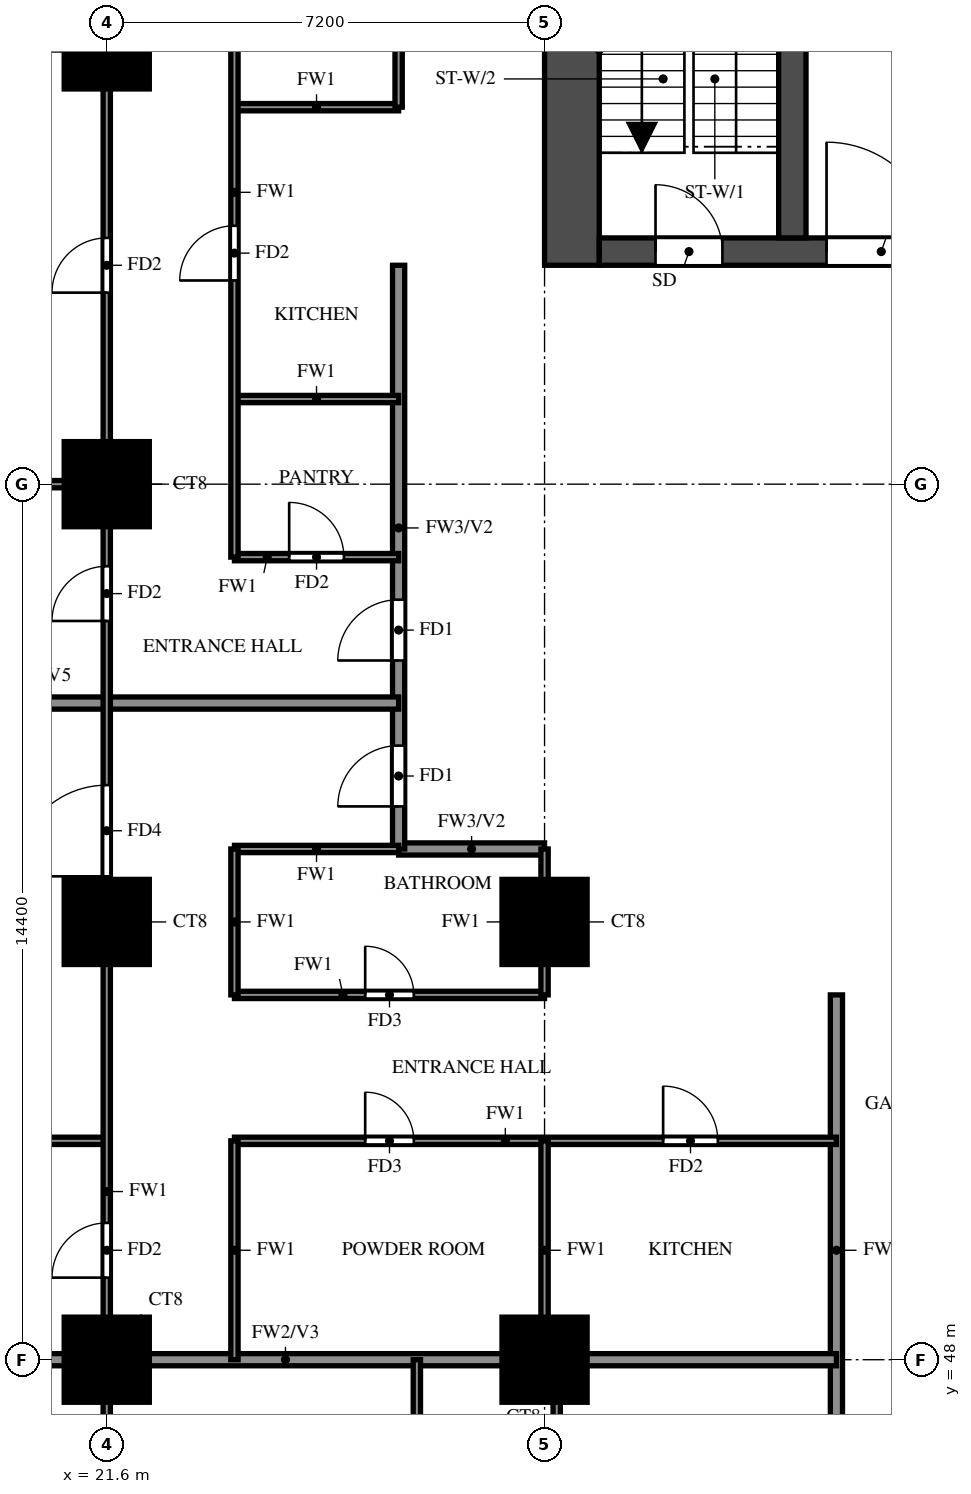
"""IFC4 building model, lengths in metres.
Left out: names, types, materials, properties, quantities, classifications, styles, units other than length and angle.
Written with IfcOpenShell. Run it as: python <this file> out.ifc"""

import sys

from ifc_helpers import new_model, si_unit, direction, frame, frame_2d, origin, origin_2d, place, context, subcontext, project, spatial, rectangle, extrude, source, transform, mapped, element, fill, save


model = new_model("IFC4")
c1 = context("Model", 3, precision=1e-05, world=origin(), true_north=direction((0.0, 1.0)))
c2 = subcontext(c1, "Body", "Model", "MODEL_VIEW")
j1 = project(units=[si_unit("LENGTHUNIT", "METRE"), si_unit("PLANEANGLEUNIT", "RADIAN")], contexts=[c1])
p1 = place(None, origin())
s1 = spatial("IfcSite", under=j1, at=p1, CompositionType="ELEMENT")
p2 = place(p1, origin())
s2 = spatial("IfcBuilding", under=s1, at=p2, CompositionType="ELEMENT")
p3 = place(p2, frame((0.0, 0.0, 41.0)))
s3 = spatial("IfcBuildingStorey", under=s2, at=p3, CompositionType="ELEMENT", Elevation=41.0)
m1 = source(origin(), c2, "Body", "SweptSolid", [
    extrude(rectangle(XDim=1.4, YDim=1.4, at=origin_2d()), origin(), (0.0, 0.0, 1.0), 3.18),
])
for number, where, z_axis, x_axis in (
    (1, (21.6, 48.0, 0.0), (0.0, 0.0, 1.0), (1.0, 0.0, 0.0)),
    (2, (28.8, 48.0, 0.0), (0.0, 0.0, 1.0), (1.0, 0.0, 0.0)),
    (3, (21.6, 55.2, 0.0), (0.0, 0.0, 1.0), (1.0, 0.0, 0.0)),
    (4, (28.8, 55.2, 0.0), (0.0, 0.0, 1.0), (1.0, 0.0, 0.0)),
    (5, (21.6, 62.4, 0.0), (0.0, 0.0, 1.0), (1.0, 0.0, 0.0)),
    (6, (21.6, 69.6, 0.0), (0.0, 0.0, 1.0), (1.0, 0.0, 0.0)),
):
    element("IfcColumn", number, at=place(p3, frame(where, z_axis=z_axis, x_axis=x_axis)), inside=s3, PredefinedType="COLUMN", context=c2, shape_type="MappedRepresentation", body=[
        mapped(m1, transform((0.0, 0.0, 0.0))),
    ])
p4 = place(p3, frame((29.25, 66.0, 0.0), z_axis=(0.0, 0.0, 1.0), x_axis=(0.0, 1.0, 0.0)))
e7 = element("IfcWall", 7, at=p4, inside=s3, PredefinedType="SHEAR", context=c2, shape_type="SweptSolid", body=[
    extrude(rectangle(XDim=12.0, YDim=0.9, at=frame_2d((6.0, 0.0))), origin(), (0.0, 0.0, 1.0), 3.18),
])
p5 = place(p3, frame((29.7, 66.225, 0.0), z_axis=(0.0, 0.0, 1.0), x_axis=(1.0, 0.0, 0.0)))
e8 = element("IfcWall", 8, at=p5, inside=s3, PredefinedType="SHEAR", context=c2, shape_type="SweptSolid", body=[
    extrude(rectangle(XDim=41.4, YDim=0.45, at=frame_2d((20.7, 0.0))), origin(), (0.0, 0.0, 1.0), 3.18),
])
p6 = place(p5, frame((0.925, 0.0, 0.0)))
e9 = element("IfcOpeningElement", 9, at=p6, cuts=e8, PredefinedType="OPENING", context=c2, shape_type="SweptSolid", body=[
    extrude(rectangle(XDim=1.1, YDim=2.1, at=frame_2d((0.55, 1.05))), frame((0.0, 0.235, 0.0), z_axis=(0.0, -1.0, 0.0), x_axis=(1.0, 0.0, 0.0)), (0.0, 0.0, 1.0), 0.47),
])
p7 = place(p5, frame((3.738, 0.0, 0.0)))
e10 = element("IfcOpeningElement", 10, at=p7, cuts=e8, PredefinedType="OPENING", context=c2, shape_type="SweptSolid", body=[
    extrude(rectangle(XDim=1.8, YDim=2.1, at=frame_2d((0.9, 1.05))), frame((0.0, 0.235, 0.0), z_axis=(0.0, -1.0, 0.0), x_axis=(1.0, 0.0, 0.0)), (0.0, 0.0, 1.0), 0.47),
])
p8 = place(p3, frame((32.875, 66.45, 0.0), z_axis=(0.0, 0.0, 1.0), x_axis=(0.0, 1.0, 0.0)))
e11 = element("IfcWall", 11, at=p8, inside=s3, PredefinedType="SHEAR", context=c2, shape_type="SweptSolid", body=[
    extrude(rectangle(XDim=10.65, YDim=0.45, at=frame_2d((5.325, 0.0))), origin(), (0.0, 0.0, 1.0), 3.18),
])
p9 = place(p3, frame((26.4, 56.4, 0.0), z_axis=(0.0, 0.0, 1.0), x_axis=(1.0, 0.0, 0.0)))
e12 = element("IfcWall", 12, at=p9, inside=s3, PredefinedType="SOLIDWALL", context=c2, shape_type="SweptSolid", body=[
    extrude(rectangle(XDim=2.4, YDim=0.2, at=frame_2d((1.2, 0.0))), origin(), (0.0, 0.0, 1.0), 3.18),
])
p10 = place(p3, frame((26.4, 56.4, 0.0), z_axis=(0.0, 0.0, 1.0), x_axis=(0.0, 1.0, 0.0)))
e13 = element("IfcWall", 13, at=p10, inside=s3, PredefinedType="SOLIDWALL", context=c2, shape_type="SweptSolid", body=[
    extrude(rectangle(XDim=9.6, YDim=0.2, at=frame_2d((4.8, 0.0))), origin(), (0.0, 0.0, 1.0), 3.18),
])
p11 = place(p10, frame((0.7, 0.0, 0.0)))
e14 = element("IfcOpeningElement", 14, at=p11, cuts=e13, PredefinedType="OPENING", context=c2, shape_type="SweptSolid", body=[
    extrude(rectangle(XDim=1.0, YDim=2.1, at=frame_2d((0.5, 1.05))), frame((0.0, 0.11, 0.0), z_axis=(0.0, -1.0, 0.0), x_axis=(1.0, 0.0, 0.0)), (0.0, 0.0, 1.0), 0.22),
])
p12 = place(p10, frame((3.1, 0.0, 0.0)))
e15 = element("IfcOpeningElement", 15, at=p12, cuts=e13, PredefinedType="OPENING", context=c2, shape_type="SweptSolid", body=[
    extrude(rectangle(XDim=1.0, YDim=2.1, at=frame_2d((0.5, 1.05))), frame((0.0, 0.11, 0.0), z_axis=(0.0, -1.0, 0.0), x_axis=(1.0, 0.0, 0.0)), (0.0, 0.0, 1.0), 0.22),
])
p13 = place(p3, frame((33.6, 45.6, 0.0), z_axis=(0.0, 0.0, 1.0), x_axis=(0.0, 1.0, 0.0)))
e16 = element("IfcWall", 16, at=p13, inside=s3, PredefinedType="SOLIDWALL", context=c2, shape_type="SweptSolid", body=[
    extrude(rectangle(XDim=8.4, YDim=0.2, at=frame_2d((4.2, 0.0))), origin(), (0.0, 0.0, 1.0), 3.18),
])
p14 = place(p3, frame((14.525, 48.0, 0.0), z_axis=(0.0, 0.0, 1.0), x_axis=(1.0, 0.0, 0.0)))
e17 = element("IfcWall", 17, at=p14, inside=s3, PredefinedType="SOLIDWALL", context=c2, shape_type="SweptSolid", body=[
    extrude(rectangle(XDim=19.075, YDim=0.2, at=frame_2d((9.538, 0.0))), origin(), (0.0, 0.0, 1.0), 3.18),
])
p15 = place(p3, frame((14.525, 58.8, 0.0), z_axis=(0.0, 0.0, 1.0), x_axis=(1.0, 0.0, 0.0)))
e18 = element("IfcWall", 18, at=p15, inside=s3, PredefinedType="SOLIDWALL", context=c2, shape_type="SweptSolid", body=[
    extrude(rectangle(XDim=11.875, YDim=0.2, at=frame_2d((5.938, 0.0))), origin(), (0.0, 0.0, 1.0), 2.28),
])
p16 = place(p3, frame((14.525, 51.6, 0.0), z_axis=(0.0, 0.0, 1.0), x_axis=(1.0, 0.0, 0.0)))
e19 = element("IfcWall", 19, at=p16, inside=s3, PredefinedType="PARTITIONING", context=c2, shape_type="SweptSolid", body=[
    extrude(rectangle(XDim=7.075, YDim=0.12, at=frame_2d((3.538, 0.0))), origin(), (0.0, 0.0, 1.0), 2.28),
])
p17 = place(p3, frame((23.7, 51.6, 0.0), z_axis=(0.0, 0.0, 1.0), x_axis=(1.0, 0.0, 0.0)))
e20 = element("IfcWall", 20, at=p17, inside=s3, PredefinedType="PARTITIONING", context=c2, shape_type="SweptSolid", body=[
    extrude(rectangle(XDim=9.9, YDim=0.12, at=frame_2d((4.95, 0.0))), origin(), (0.0, 0.0, 1.0), 3.18),
])
p18 = place(p17, frame((2.15, 0.0, 0.0)))
e21 = element("IfcOpeningElement", 21, at=p18, cuts=e20, PredefinedType="OPENING", context=c2, shape_type="SweptSolid", body=[
    extrude(rectangle(XDim=0.8, YDim=2.1, at=frame_2d((0.4, 1.05))), frame((0.0, 0.07, 0.0), z_axis=(0.0, -1.0, 0.0), x_axis=(1.0, 0.0, 0.0)), (0.0, 0.0, 1.0), 0.14),
])
p19 = place(p17, frame((7.05, 0.0, 0.0)))
e22 = element("IfcOpeningElement", 22, at=p19, cuts=e20, PredefinedType="OPENING", context=c2, shape_type="SweptSolid", body=[
    extrude(rectangle(XDim=0.9, YDim=2.1, at=frame_2d((0.45, 1.05))), frame((0.0, 0.07, 0.0), z_axis=(0.0, -1.0, 0.0), x_axis=(1.0, 0.0, 0.0)), (0.0, 0.0, 1.0), 0.14),
])
p20 = place(p3, frame((23.7, 54.0, 0.0), z_axis=(0.0, 0.0, 1.0), x_axis=(1.0, 0.0, 0.0)))
e23 = element("IfcWall", 23, at=p20, inside=s3, PredefinedType="PARTITIONING", context=c2, shape_type="SweptSolid", body=[
    extrude(rectangle(XDim=5.1, YDim=0.12, at=frame_2d((2.55, 0.0))), origin(), (0.0, 0.0, 1.0), 3.18),
])
p21 = place(p20, frame((2.15, 0.0, 0.0)))
e24 = element("IfcOpeningElement", 24, at=p21, cuts=e23, PredefinedType="OPENING", context=c2, shape_type="SweptSolid", body=[
    extrude(rectangle(XDim=0.8, YDim=2.1, at=frame_2d((0.4, 1.05))), frame((0.0, 0.07, 0.0), z_axis=(0.0, -1.0, 0.0), x_axis=(1.0, 0.0, 0.0)), (0.0, 0.0, 1.0), 0.14),
])
p22 = place(p3, frame((23.7, 56.4, 0.0), z_axis=(0.0, 0.0, 1.0), x_axis=(1.0, 0.0, 0.0)))
e25 = element("IfcWall", 25, at=p22, inside=s3, PredefinedType="PARTITIONING", context=c2, shape_type="SweptSolid", body=[
    extrude(rectangle(XDim=2.7, YDim=0.12, at=frame_2d((1.35, 0.0))), origin(), (0.0, 0.0, 1.0), 3.18),
])
p23 = place(p3, frame((23.7, 61.2, 0.0), z_axis=(0.0, 0.0, 1.0), x_axis=(1.0, 0.0, 0.0)))
e26 = element("IfcWall", 26, at=p23, inside=s3, PredefinedType="PARTITIONING", context=c2, shape_type="SweptSolid", body=[
    extrude(rectangle(XDim=2.7, YDim=0.12, at=frame_2d((1.35, 0.0))), origin(), (0.0, 0.0, 1.0), 3.18),
])
p24 = place(p23, frame((0.9, 0.0, 0.0)))
e27 = element("IfcOpeningElement", 27, at=p24, cuts=e26, PredefinedType="OPENING", context=c2, shape_type="SweptSolid", body=[
    extrude(rectangle(XDim=0.9, YDim=2.1, at=frame_2d((0.45, 1.05))), frame((0.0, 0.07, 0.0), z_axis=(0.0, -1.0, 0.0), x_axis=(1.0, 0.0, 0.0)), (0.0, 0.0, 1.0), 0.14),
])
p25 = place(p3, frame((14.525, 62.4, 0.0), z_axis=(0.0, 0.0, 1.0), x_axis=(1.0, 0.0, 0.0)))
e28 = element("IfcWall", 28, at=p25, inside=s3, PredefinedType="PARTITIONING", context=c2, shape_type="SweptSolid", body=[
    extrude(rectangle(XDim=7.075, YDim=0.12, at=frame_2d((3.538, 0.0))), origin(), (0.0, 0.0, 1.0), 3.18),
])
for number, where, z_axis, x_axis in (
    (29, (23.7, 63.8, 0.0), (0.0, 0.0, 1.0), (1.0, 0.0, 0.0)),
    (30, (23.7, 68.6, 0.0), (0.0, 0.0, 1.0), (1.0, 0.0, 0.0)),
):
    element("IfcWall", number, at=place(p3, frame(where, z_axis=z_axis, x_axis=x_axis)), inside=s3, PredefinedType="PARTITIONING", context=c2, shape_type="SweptSolid", body=[
        extrude(rectangle(XDim=2.7, YDim=0.12, at=frame_2d((1.35, 0.0))), origin(), (0.0, 0.0, 1.0), 3.18),
    ])
p26 = place(p3, frame((21.6, 33.725, 0.0), z_axis=(0.0, 0.0, 1.0), x_axis=(0.0, 1.0, 0.0)))
e31 = element("IfcWall", 31, at=p26, inside=s3, PredefinedType="PARTITIONING", context=c2, shape_type="SweptSolid", body=[
    extrude(rectangle(XDim=35.875, YDim=0.12, at=frame_2d((17.938, 0.0))), origin(), (0.0, 0.0, 1.0), 3.18),
])
p27 = place(p26, frame((7.775, 0.0, 0.0)))
e32 = element("IfcOpeningElement", 32, at=p27, cuts=e31, PredefinedType="OPENING", context=c2, shape_type="SweptSolid", body=[
    extrude(rectangle(XDim=0.9, YDim=2.1, at=frame_2d((0.45, 1.05))), frame((0.0, 0.07, 0.0), z_axis=(0.0, -1.0, 0.0), x_axis=(1.0, 0.0, 0.0)), (0.0, 0.0, 1.0), 0.14),
])
p28 = place(p26, frame((15.625, 0.0, 0.0)))
e33 = element("IfcOpeningElement", 33, at=p28, cuts=e31, PredefinedType="OPENING", context=c2, shape_type="SweptSolid", body=[
    extrude(rectangle(XDim=0.9, YDim=2.1, at=frame_2d((0.45, 1.05))), frame((0.0, 0.07, 0.0), z_axis=(0.0, -1.0, 0.0), x_axis=(1.0, 0.0, 0.0)), (0.0, 0.0, 1.0), 0.14),
])
p29 = place(p26, frame((22.225, 0.0, 0.0)))
e34 = element("IfcOpeningElement", 34, at=p29, cuts=e31, PredefinedType="OPENING", context=c2, shape_type="SweptSolid", body=[
    extrude(rectangle(XDim=1.5, YDim=2.1, at=frame_2d((0.75, 1.05))), frame((0.0, 0.07, 0.0), z_axis=(0.0, -1.0, 0.0), x_axis=(1.0, 0.0, 0.0)), (0.0, 0.0, 1.0), 0.14),
])
p30 = place(p26, frame((26.425, 0.0, 0.0)))
e35 = element("IfcOpeningElement", 35, at=p30, cuts=e31, PredefinedType="OPENING", context=c2, shape_type="SweptSolid", body=[
    extrude(rectangle(XDim=0.9, YDim=2.1, at=frame_2d((0.45, 1.05))), frame((0.0, 0.07, 0.0), z_axis=(0.0, -1.0, 0.0), x_axis=(1.0, 0.0, 0.0)), (0.0, 0.0, 1.0), 0.14),
])
p31 = place(p26, frame((31.825, 0.0, 0.0)))
e36 = element("IfcOpeningElement", 36, at=p31, cuts=e31, PredefinedType="OPENING", context=c2, shape_type="SweptSolid", body=[
    extrude(rectangle(XDim=0.9, YDim=2.1, at=frame_2d((0.45, 1.05))), frame((0.0, 0.07, 0.0), z_axis=(0.0, -1.0, 0.0), x_axis=(1.0, 0.0, 0.0)), (0.0, 0.0, 1.0), 0.14),
])
p32 = place(p3, frame((23.7, 48.0, 0.0), z_axis=(0.0, 0.0, 1.0), x_axis=(0.0, 1.0, 0.0)))
e37 = element("IfcWall", 37, at=p32, inside=s3, PredefinedType="PARTITIONING", context=c2, shape_type="SweptSolid", body=[
    extrude(rectangle(XDim=3.6, YDim=0.12, at=frame_2d((1.8, 0.0))), origin(), (0.0, 0.0, 1.0), 3.18),
])
p33 = place(p3, frame((23.7, 54.0, 0.0), z_axis=(0.0, 0.0, 1.0), x_axis=(0.0, 1.0, 0.0)))
e38 = element("IfcWall", 38, at=p33, inside=s3, PredefinedType="PARTITIONING", context=c2, shape_type="SweptSolid", body=[
    extrude(rectangle(XDim=2.4, YDim=0.12, at=frame_2d((1.2, 0.0))), origin(), (0.0, 0.0, 1.0), 3.18),
])
p34 = place(p3, frame((23.7, 61.2, 0.0), z_axis=(0.0, 0.0, 1.0), x_axis=(0.0, 1.0, 0.0)))
e39 = element("IfcWall", 39, at=p34, inside=s3, PredefinedType="PARTITIONING", context=c2, shape_type="SweptSolid", body=[
    extrude(rectangle(XDim=12.0, YDim=0.12, at=frame_2d((6.0, 0.0))), origin(), (0.0, 0.0, 1.0), 3.18),
])
p35 = place(p34, frame((4.55, 0.0, 0.0)))
e40 = element("IfcOpeningElement", 40, at=p35, cuts=e39, PredefinedType="OPENING", context=c2, shape_type="SweptSolid", body=[
    extrude(rectangle(XDim=0.9, YDim=2.1, at=frame_2d((0.45, 1.05))), frame((0.0, 0.07, 0.0), z_axis=(0.0, -1.0, 0.0), x_axis=(1.0, 0.0, 0.0)), (0.0, 0.0, 1.0), 0.14),
])
p36 = place(p34, frame((9.3, 0.0, 0.0)))
e41 = element("IfcOpeningElement", 41, at=p36, cuts=e39, PredefinedType="OPENING", context=c2, shape_type="SweptSolid", body=[
    extrude(rectangle(XDim=0.8, YDim=2.1, at=frame_2d((0.4, 1.05))), frame((0.0, 0.07, 0.0), z_axis=(0.0, -1.0, 0.0), x_axis=(1.0, 0.0, 0.0)), (0.0, 0.0, 1.0), 0.14),
])
p37 = place(p3, frame((26.4, 68.6, 0.0), z_axis=(0.0, 0.0, 1.0), x_axis=(0.0, 1.0, 0.0)))
e42 = element("IfcWall", 42, at=p37, inside=s3, PredefinedType="PARTITIONING", context=c2, shape_type="SweptSolid", body=[
    extrude(rectangle(XDim=4.6, YDim=0.12, at=frame_2d((2.3, 0.0))), origin(), (0.0, 0.0, 1.0), 3.18),
])
p38 = place(p3, frame((26.7, 42.9, 0.0), z_axis=(0.0, 0.0, 1.0), x_axis=(0.0, 1.0, 0.0)))
e43 = element("IfcWall", 43, at=p38, inside=s3, PredefinedType="PARTITIONING", context=c2, shape_type="SweptSolid", body=[
    extrude(rectangle(XDim=5.1, YDim=0.12, at=frame_2d((2.55, 0.0))), origin(), (0.0, 0.0, 1.0), 3.18),
])
p39 = place(p3, frame((28.8, 48.0, 0.0), z_axis=(0.0, 0.0, 1.0), x_axis=(0.0, 1.0, 0.0)))
e44 = element("IfcWall", 44, at=p39, inside=s3, PredefinedType="PARTITIONING", context=c2, shape_type="SweptSolid", body=[
    extrude(rectangle(XDim=3.6, YDim=0.12, at=frame_2d((1.8, 0.0))), origin(), (0.0, 0.0, 1.0), 3.18),
])
p40 = place(p3, frame((28.8, 54.0, 0.0), z_axis=(0.0, 0.0, 1.0), x_axis=(0.0, 1.0, 0.0)))
e45 = element("IfcWall", 45, at=p40, inside=s3, PredefinedType="PARTITIONING", context=c2, shape_type="SweptSolid", body=[
    extrude(rectangle(XDim=2.4, YDim=0.12, at=frame_2d((1.2, 0.0))), origin(), (0.0, 0.0, 1.0), 3.18),
])
p41 = place(p3, frame((29.0, 42.9, 0.0), z_axis=(0.0, 0.0, 1.0), x_axis=(0.0, 1.0, 0.0)))
e46 = element("IfcWall", 46, at=p41, inside=s3, PredefinedType="PARTITIONING", context=c2, shape_type="SweptSolid", body=[
    extrude(rectangle(XDim=5.1, YDim=0.12, at=frame_2d((2.55, 0.0))), origin(), (0.0, 0.0, 1.0), 3.18),
])
p42 = place(p6, origin())
e47 = element("IfcDoor", 47, at=p42, inside=s3, OperationType="SINGLE_SWING_LEFT", PredefinedType="DOOR", context=c2, shape_type="SweptSolid", body=[
    extrude(rectangle(XDim=1.1, YDim=2.1, at=frame_2d((0.55, 1.05))), frame((0.0, 0.025, 0.0), z_axis=(0.0, -1.0, 0.0), x_axis=(1.0, 0.0, 0.0)), (0.0, 0.0, 1.0), 0.05),
])
fill(e9, e47)
p43 = place(p7, origin())
e48 = element("IfcDoor", 48, at=p43, inside=s3, OperationType="DOUBLE_DOOR_SINGLE_SWING", PredefinedType="DOOR", context=c2, shape_type="SweptSolid", body=[
    extrude(rectangle(XDim=1.8, YDim=2.1, at=frame_2d((0.9, 1.05))), frame((0.0, 0.025, 0.0), z_axis=(0.0, -1.0, 0.0), x_axis=(1.0, 0.0, 0.0)), (0.0, 0.0, 1.0), 0.05),
])
fill(e10, e48)
p44 = place(p11, origin())
e49 = element("IfcDoor", 49, at=p44, inside=s3, OperationType="SINGLE_SWING_RIGHT", PredefinedType="DOOR", context=c2, shape_type="SweptSolid", body=[
    extrude(rectangle(XDim=1.0, YDim=2.1, at=frame_2d((0.5, 1.05))), frame((0.0, 0.025, 0.0), z_axis=(0.0, -1.0, 0.0), x_axis=(1.0, 0.0, 0.0)), (0.0, 0.0, 1.0), 0.05),
])
fill(e14, e49)
p45 = place(p28, origin())
e50 = element("IfcDoor", 50, at=p45, inside=s3, OperationType="SINGLE_SWING_LEFT", PredefinedType="DOOR", context=c2, shape_type="SweptSolid", body=[
    extrude(rectangle(XDim=0.9, YDim=2.1, at=frame_2d((0.45, 1.05))), frame((0.0, 0.025, 0.0), z_axis=(0.0, -1.0, 0.0), x_axis=(1.0, 0.0, 0.0)), (0.0, 0.0, 1.0), 0.05),
])
fill(e33, e50)
p46 = place(p29, origin())
e51 = element("IfcDoor", 51, at=p46, inside=s3, OperationType="SINGLE_SWING_RIGHT", PredefinedType="DOOR", context=c2, shape_type="SweptSolid", body=[
    extrude(rectangle(XDim=1.5, YDim=2.1, at=frame_2d((0.75, 1.05))), frame((0.0, 0.025, 0.0), z_axis=(0.0, -1.0, 0.0), x_axis=(1.0, 0.0, 0.0)), (0.0, 0.0, 1.0), 0.05),
])
fill(e34, e51)
p47 = place(p18, origin())
e52 = element("IfcDoor", 52, at=p47, inside=s3, OperationType="SINGLE_SWING_RIGHT", PredefinedType="DOOR", context=c2, shape_type="SweptSolid", body=[
    extrude(rectangle(XDim=0.8, YDim=2.1, at=frame_2d((0.4, 1.05))), frame((0.0, 0.025, 0.0), z_axis=(0.0, -1.0, 0.0), x_axis=(1.0, 0.0, 0.0)), (0.0, 0.0, 1.0), 0.05),
])
fill(e21, e52)
p48 = place(p21, origin())
e53 = element("IfcDoor", 53, at=p48, inside=s3, OperationType="SINGLE_SWING_LEFT", PredefinedType="DOOR", context=c2, shape_type="SweptSolid", body=[
    extrude(rectangle(XDim=0.8, YDim=2.1, at=frame_2d((0.4, 1.05))), frame((0.0, 0.025, 0.0), z_axis=(0.0, -1.0, 0.0), x_axis=(1.0, 0.0, 0.0)), (0.0, 0.0, 1.0), 0.05),
])
fill(e24, e53)
p49 = place(p19, origin())
e54 = element("IfcDoor", 54, at=p49, inside=s3, OperationType="SINGLE_SWING_LEFT", PredefinedType="DOOR", context=c2, shape_type="SweptSolid", body=[
    extrude(rectangle(XDim=0.9, YDim=2.1, at=frame_2d((0.45, 1.05))), frame((0.0, 0.025, 0.0), z_axis=(0.0, -1.0, 0.0), x_axis=(1.0, 0.0, 0.0)), (0.0, 0.0, 1.0), 0.05),
])
fill(e22, e54)
p50 = place(p12, origin())
e55 = element("IfcDoor", 55, at=p50, inside=s3, OperationType="SINGLE_SWING_LEFT", PredefinedType="DOOR", context=c2, shape_type="SweptSolid", body=[
    extrude(rectangle(XDim=1.0, YDim=2.1, at=frame_2d((0.5, 1.05))), frame((0.0, 0.025, 0.0), z_axis=(0.0, -1.0, 0.0), x_axis=(1.0, 0.0, 0.0)), (0.0, 0.0, 1.0), 0.05),
])
fill(e15, e55)
p51 = place(p30, origin())
e56 = element("IfcDoor", 56, at=p51, inside=s3, OperationType="SINGLE_SWING_RIGHT", PredefinedType="DOOR", context=c2, shape_type="SweptSolid", body=[
    extrude(rectangle(XDim=0.9, YDim=2.1, at=frame_2d((0.45, 1.05))), frame((0.0, 0.025, 0.0), z_axis=(0.0, -1.0, 0.0), x_axis=(1.0, 0.0, 0.0)), (0.0, 0.0, 1.0), 0.05),
])
fill(e35, e56)
p52 = place(p31, origin())
e57 = element("IfcDoor", 57, at=p52, inside=s3, OperationType="SINGLE_SWING_LEFT", PredefinedType="DOOR", context=c2, shape_type="SweptSolid", body=[
    extrude(rectangle(XDim=0.9, YDim=2.1, at=frame_2d((0.45, 1.05))), frame((0.0, 0.025, 0.0), z_axis=(0.0, -1.0, 0.0), x_axis=(1.0, 0.0, 0.0)), (0.0, 0.0, 1.0), 0.05),
])
fill(e36, e57)
p53 = place(p24, origin())
e58 = element("IfcDoor", 58, at=p53, inside=s3, OperationType="SINGLE_SWING_LEFT", PredefinedType="DOOR", context=c2, shape_type="SweptSolid", body=[
    extrude(rectangle(XDim=0.9, YDim=2.1, at=frame_2d((0.45, 1.05))), frame((0.0, 0.025, 0.0), z_axis=(0.0, -1.0, 0.0), x_axis=(1.0, 0.0, 0.0)), (0.0, 0.0, 1.0), 0.05),
])
fill(e27, e58)
p54 = place(p35, origin())
e59 = element("IfcDoor", 59, at=p54, inside=s3, OperationType="SINGLE_SWING_LEFT", PredefinedType="DOOR", context=c2, shape_type="SweptSolid", body=[
    extrude(rectangle(XDim=0.9, YDim=2.1, at=frame_2d((0.45, 1.05))), frame((0.0, 0.025, 0.0), z_axis=(0.0, -1.0, 0.0), x_axis=(1.0, 0.0, 0.0)), (0.0, 0.0, 1.0), 0.05),
])
fill(e40, e59)
save(model, sys.argv[1])
